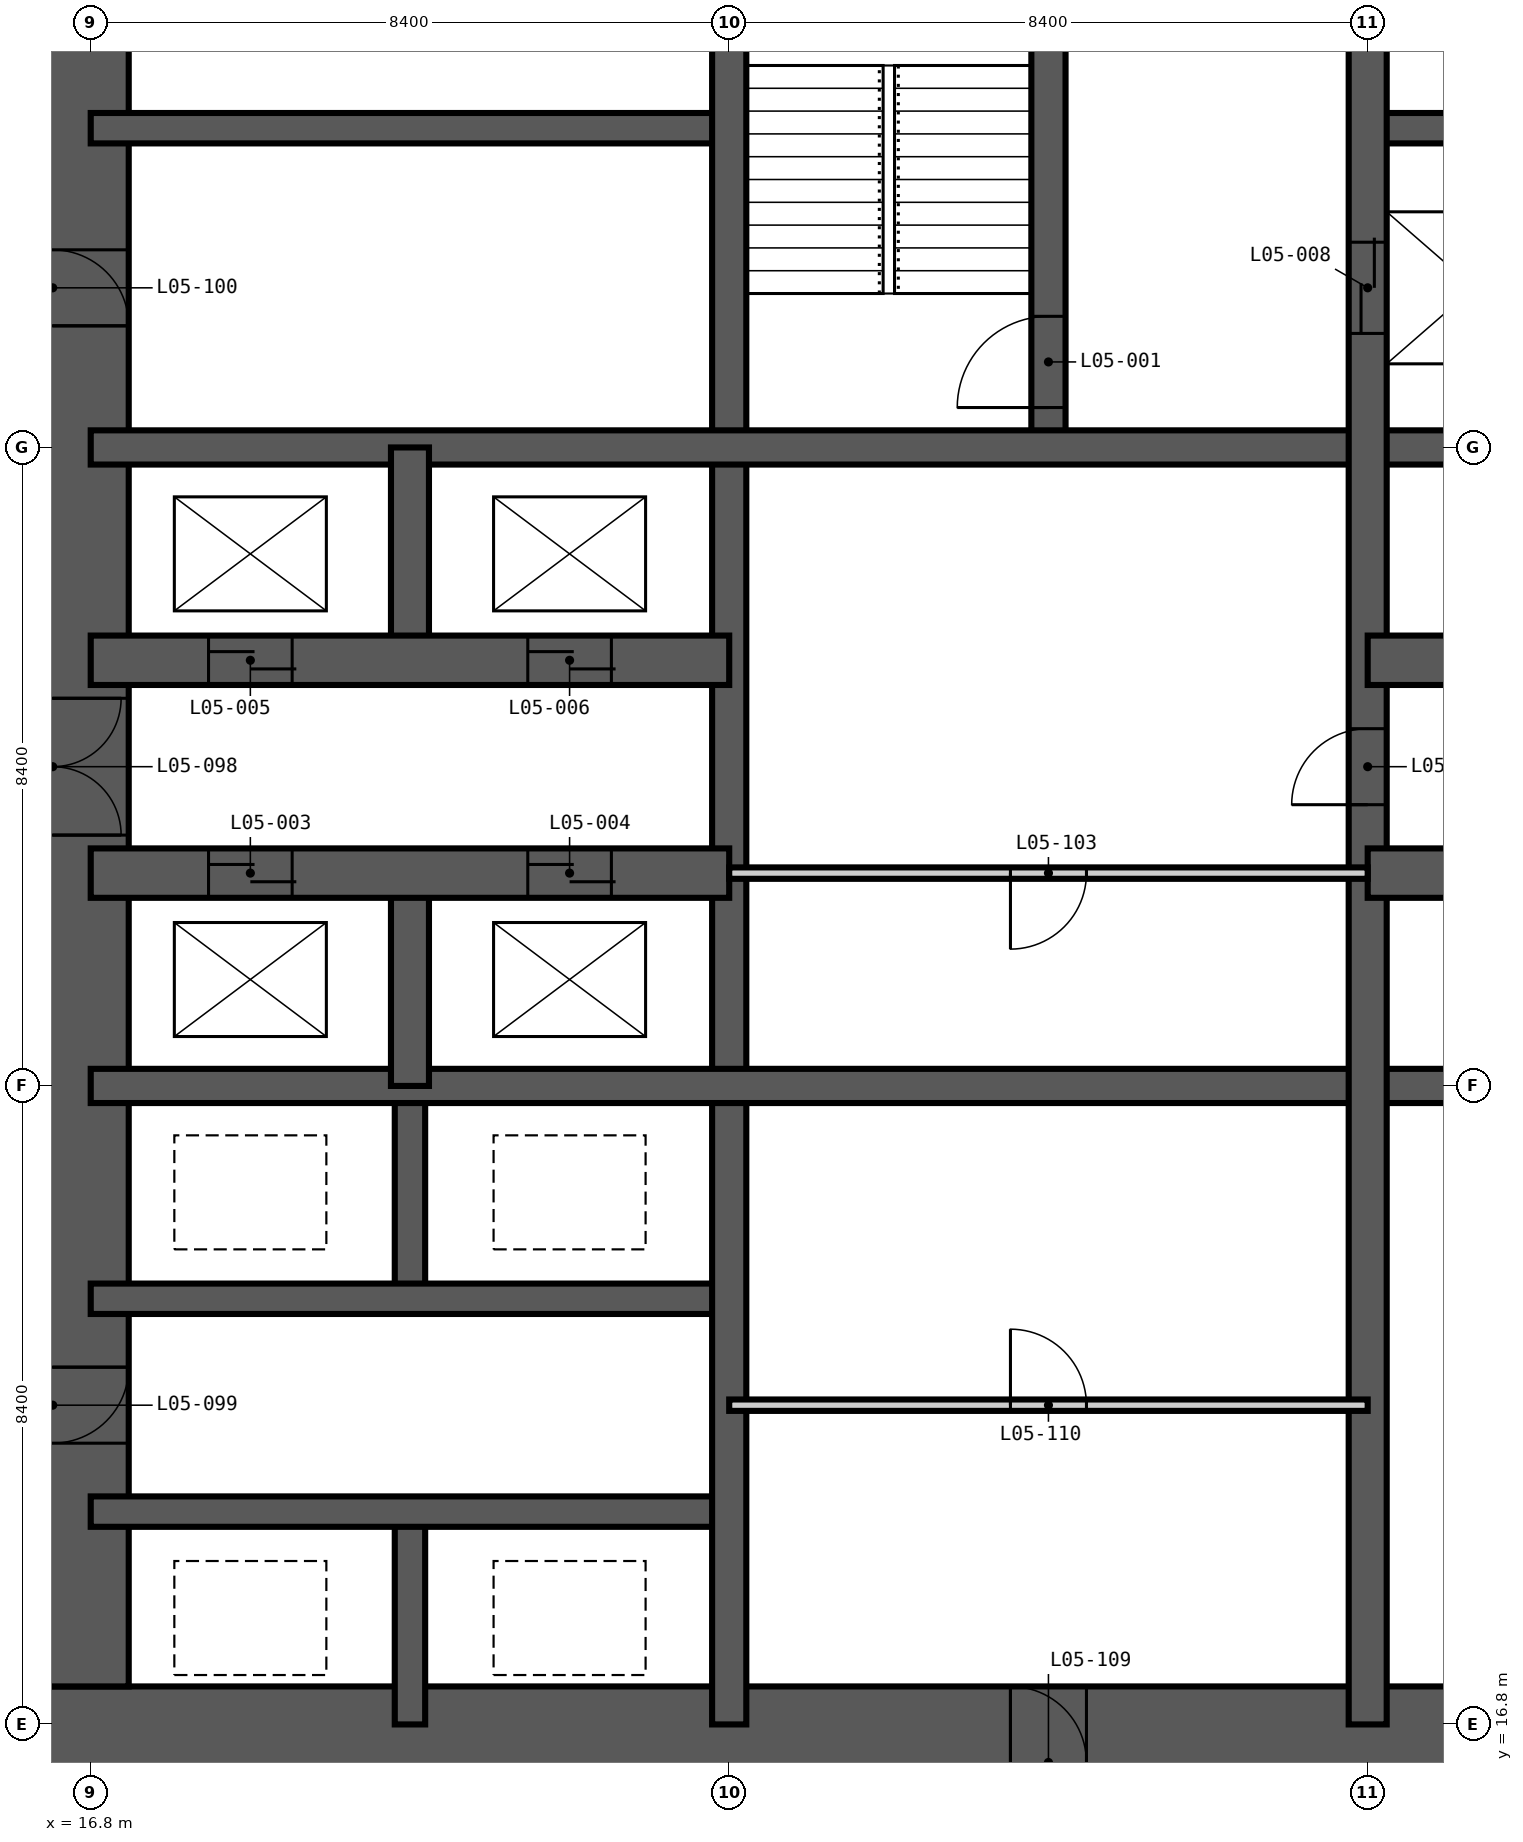
"""IFC4 building model, lengths in metres.
Left out: names, types, materials, properties, quantities, classifications, styles, units other than length and angle.
Written with IfcOpenShell. Run it as: python <this file> out.ifc"""

import sys

from ifc_helpers import new_model, si_unit, direction, frame, frame_2d, origin, place, context, subcontext, project, spatial, rectangle, extrude, element, fill, save


model = new_model("IFC4")
c1 = context("Model", 3, precision=1e-05, world=origin(), true_north=direction((0.0, 1.0)))
c2 = subcontext(c1, "Body", "Model", "MODEL_VIEW")
j1 = project(units=[si_unit("LENGTHUNIT", "METRE"), si_unit("PLANEANGLEUNIT", "RADIAN")], contexts=[c1])
p1 = place(None, origin())
s1 = spatial("IfcSite", under=j1, at=p1, CompositionType="ELEMENT")
p2 = place(p1, origin())
s2 = spatial("IfcBuilding", under=s1, at=p2, CompositionType="ELEMENT")
p3 = place(p2, frame((0.0, 0.0, 27.0)))
s3 = spatial("IfcBuildingStorey", under=s2, at=p3, CompositionType="ELEMENT", Elevation=27.0)
p4 = place(p3, frame((15.3, 16.3, -0.35), z_axis=(0.0, 0.0, 1.0), x_axis=(1.0, 0.0, 0.0)))
e1 = element("IfcWall", 1, at=p4, inside=s3, PredefinedType="SHEAR", context=c2, shape_type="SweptSolid", body=[
    extrude(rectangle(XDim=28.2, YDim=2.0, at=frame_2d((14.1, 0.0))), origin(), (0.0, 0.0, 1.0), 3.6),
])
p5 = place(p4, frame((13.6, 0.0, 0.35)))
e2 = element("IfcOpeningElement", 2, at=p5, cuts=e1, PredefinedType="OPENING", context=c2, shape_type="SweptSolid", body=[
    extrude(rectangle(XDim=1.0, YDim=2.1, at=frame_2d((0.5, 1.05))), frame((0.0, 1.01, 0.0), z_axis=(0.0, -1.0, 0.0), x_axis=(1.0, 0.0, 0.0)), (0.0, 0.0, 1.0), 2.02),
])
p6 = place(p4, frame((19.9, 0.0, 0.35)))
e3 = element("IfcOpeningElement", 3, at=p6, cuts=e1, PredefinedType="OPENING", context=c2, shape_type="SweptSolid", body=[
    extrude(rectangle(XDim=1.0, YDim=2.1, at=frame_2d((0.5, 1.05))), frame((0.0, 1.01, 0.0), z_axis=(0.0, -1.0, 0.0), x_axis=(1.0, 0.0, 0.0)), (0.0, 0.0, 1.0), 2.02),
])
p7 = place(p3, frame((16.3, 41.5, -0.35), z_axis=(0.0, 0.0, 1.0), x_axis=(0.0, -1.0, 0.0)))
e4 = element("IfcWall", 4, at=p7, inside=s3, PredefinedType="SHEAR", context=c2, shape_type="SweptSolid", body=[
    extrude(rectangle(XDim=24.2, YDim=2.0, at=frame_2d((12.1, 0.0))), origin(), (0.0, 0.0, 1.0), 3.6),
])
p8 = place(p7, frame((11.2, 0.0, 0.35)))
e5 = element("IfcOpeningElement", 5, at=p8, cuts=e4, PredefinedType="OPENING", context=c2, shape_type="SweptSolid", body=[
    extrude(rectangle(XDim=1.8, YDim=2.2, at=frame_2d((0.9, 1.1))), frame((0.0, 1.01, 0.0), z_axis=(0.0, -1.0, 0.0), x_axis=(1.0, 0.0, 0.0)), (0.0, 0.0, 1.0), 2.02),
])
p9 = place(p7, frame((20.0, 0.0, 0.35)))
e6 = element("IfcOpeningElement", 6, at=p9, cuts=e4, PredefinedType="OPENING", context=c2, shape_type="SweptSolid", body=[
    extrude(rectangle(XDim=1.0, YDim=2.1, at=frame_2d((0.5, 1.05))), frame((0.0, 1.01, 0.0), z_axis=(0.0, -1.0, 0.0), x_axis=(1.0, 0.0, 0.0)), (0.0, 0.0, 1.0), 2.02),
])
p10 = place(p7, frame((5.3, 0.0, 0.35)))
e7 = element("IfcOpeningElement", 7, at=p10, cuts=e4, PredefinedType="OPENING", context=c2, shape_type="SweptSolid", body=[
    extrude(rectangle(XDim=1.0, YDim=2.1, at=frame_2d((0.5, 1.05))), frame((0.0, 1.01, 0.0), z_axis=(0.0, -1.0, 0.0), x_axis=(1.0, 0.0, 0.0)), (0.0, 0.0, 1.0), 2.02),
])
for number, where, z_axis, x_axis in (
    (8, (21.0, 16.8, -0.35), (0.0, 0.0, 1.0), (0.0, 1.0, 0.0)),
    (9, (21.0, 22.4, -0.35), (0.0, 0.0, 1.0), (0.0, 1.0, 0.0)),
):
    element("IfcWall", number, at=place(p3, frame(where, z_axis=z_axis, x_axis=x_axis)), inside=s3, PredefinedType="SHEAR", context=c2, shape_type="SweptSolid", body=[
        extrude(rectangle(XDim=2.8, YDim=0.4, at=frame_2d((1.4, 0.0))), origin(), (0.0, 0.0, 1.0), 3.6),
    ])
for number, where, z_axis, x_axis in (
    (10, (16.8, 19.6, -0.35), (0.0, 0.0, 1.0), (1.0, 0.0, 0.0)),
    (11, (16.8, 22.4, -0.35), (0.0, 0.0, 1.0), (1.0, 0.0, 0.0)),
    (12, (16.8, 37.8, -0.35), (0.0, 0.0, 1.0), (1.0, 0.0, 0.0)),
):
    element("IfcWall", number, at=place(p3, frame(where, z_axis=z_axis, x_axis=x_axis)), inside=s3, PredefinedType="SHEAR", context=c2, shape_type="SweptSolid", body=[
        extrude(rectangle(XDim=8.4, YDim=0.4, at=frame_2d((4.2, 0.0))), origin(), (0.0, 0.0, 1.0), 3.6),
    ])
p11 = place(p3, frame((33.6, 37.8, -0.35), z_axis=(0.0, 0.0, 1.0), x_axis=(1.0, 0.0, 0.0)))
e13 = element("IfcWall", 13, at=p11, inside=s3, PredefinedType="SHEAR", context=c2, shape_type="SweptSolid", body=[
    extrude(rectangle(XDim=2.8, YDim=0.4, at=frame_2d((1.4, 0.0))), origin(), (0.0, 0.0, 1.0), 3.6),
])
p12 = place(p3, frame((25.2, 16.8, -0.35), z_axis=(0.0, 0.0, 1.0), x_axis=(0.0, 1.0, 0.0)))
e14 = element("IfcWall", 14, at=p12, inside=s3, PredefinedType="SHEAR", context=c2, shape_type="SweptSolid", body=[
    extrude(rectangle(XDim=25.2, YDim=0.45, at=frame_2d((12.6, 0.0))), origin(), (0.0, 0.0, 1.0), 3.6),
])
p13 = place(p3, frame((29.4, 33.6, -0.35), z_axis=(0.0, 0.0, 1.0), x_axis=(0.0, 1.0, 0.0)))
e15 = element("IfcWall", 15, at=p13, inside=s3, PredefinedType="SHEAR", context=c2, shape_type="SweptSolid", body=[
    extrude(rectangle(XDim=8.4, YDim=0.45, at=frame_2d((4.2, 0.0))), origin(), (0.0, 0.0, 1.0), 3.6),
])
p14 = place(p13, frame((0.525, 0.0, 0.35)))
e16 = element("IfcOpeningElement", 16, at=p14, cuts=e15, PredefinedType="OPENING", context=c2, shape_type="SweptSolid", body=[
    extrude(rectangle(XDim=1.2, YDim=2.2, at=frame_2d((0.6, 1.1))), frame((0.0, 0.235, 0.0), z_axis=(0.0, -1.0, 0.0), x_axis=(1.0, 0.0, 0.0)), (0.0, 0.0, 1.0), 0.47),
])
for number, where, z_axis, x_axis in (
    (17, (16.8, 25.2, -0.35), (0.0, 0.0, 1.0), (1.0, 0.0, 0.0)),
    (18, (16.8, 33.6, -0.35), (0.0, 0.0, 1.0), (1.0, 0.0, 0.0)),
):
    element("IfcWall", number, at=place(p3, frame(where, z_axis=z_axis, x_axis=x_axis)), inside=s3, PredefinedType="SHEAR", context=c2, shape_type="SweptSolid", body=[
        extrude(rectangle(XDim=25.2, YDim=0.45, at=frame_2d((12.6, 0.0))), origin(), (0.0, 0.0, 1.0), 3.6),
    ])
for number, where, z_axis, x_axis in (
    (19, (21.0, 25.2, -0.35), (0.0, 0.0, 1.0), (0.0, 1.0, 0.0)),
    (20, (21.0, 30.8, -0.35), (0.0, 0.0, 1.0), (0.0, 1.0, 0.0)),
):
    element("IfcWall", number, at=place(p3, frame(where, z_axis=z_axis, x_axis=x_axis)), inside=s3, PredefinedType="SHEAR", context=c2, shape_type="SweptSolid", body=[
        extrude(rectangle(XDim=2.8, YDim=0.5, at=frame_2d((1.4, 0.0))), origin(), (0.0, 0.0, 1.0), 3.6),
    ])
p15 = place(p3, frame((33.6, 16.8, -0.35), z_axis=(0.0, 0.0, 1.0), x_axis=(0.0, 1.0, 0.0)))
e21 = element("IfcWall", 21, at=p15, inside=s3, PredefinedType="SHEAR", context=c2, shape_type="SweptSolid", body=[
    extrude(rectangle(XDim=25.2, YDim=0.5, at=frame_2d((12.6, 0.0))), origin(), (0.0, 0.0, 1.0), 3.6),
])
p16 = place(p15, frame((22.5, 0.0, 0.35)))
e22 = element("IfcOpeningElement", 22, at=p16, cuts=e21, PredefinedType="OPENING", context=c2, shape_type="SweptSolid", body=[
    extrude(rectangle(XDim=1.2, YDim=2.2, at=frame_2d((0.6, 1.1))), frame((0.0, 0.26, 0.0), z_axis=(0.0, -1.0, 0.0), x_axis=(1.0, 0.0, 0.0)), (0.0, 0.0, 1.0), 0.52),
])
p17 = place(p15, frame((18.3, 0.0, 0.35)))
e23 = element("IfcOpeningElement", 23, at=p17, cuts=e21, PredefinedType="OPENING", context=c2, shape_type="SweptSolid", body=[
    extrude(rectangle(XDim=1.2, YDim=2.2, at=frame_2d((0.6, 1.1))), frame((0.0, 0.26, 0.0), z_axis=(0.0, -1.0, 0.0), x_axis=(1.0, 0.0, 0.0)), (0.0, 0.0, 1.0), 0.52),
])
p18 = place(p15, frame((12.1, 0.0, 0.35)))
e24 = element("IfcOpeningElement", 24, at=p18, cuts=e21, PredefinedType="OPENING", context=c2, shape_type="SweptSolid", body=[
    extrude(rectangle(XDim=1.0, YDim=2.1, at=frame_2d((0.5, 1.05))), frame((0.0, 0.26, 0.0), z_axis=(0.0, -1.0, 0.0), x_axis=(1.0, 0.0, 0.0)), (0.0, 0.0, 1.0), 0.52),
])
p19 = place(p3, frame((16.8, 28.0, -0.35), z_axis=(0.0, 0.0, 1.0), x_axis=(1.0, 0.0, 0.0)))
e25 = element("IfcWall", 25, at=p19, inside=s3, PredefinedType="SHEAR", context=c2, shape_type="SweptSolid", body=[
    extrude(rectangle(XDim=8.4, YDim=0.65, at=frame_2d((4.2, 0.0))), origin(), (0.0, 0.0, 1.0), 3.6),
])
p20 = place(p19, frame((1.55, 0.0, 0.35)))
e26 = element("IfcOpeningElement", 26, at=p20, cuts=e25, PredefinedType="OPENING", context=c2, shape_type="SweptSolid", body=[
    extrude(rectangle(XDim=1.1, YDim=2.2, at=frame_2d((0.55, 1.1))), frame((0.0, 0.335, 0.0), z_axis=(0.0, -1.0, 0.0), x_axis=(1.0, 0.0, 0.0)), (0.0, 0.0, 1.0), 0.67),
])
p21 = place(p19, frame((5.75, 0.0, 0.35)))
e27 = element("IfcOpeningElement", 27, at=p21, cuts=e25, PredefinedType="OPENING", context=c2, shape_type="SweptSolid", body=[
    extrude(rectangle(XDim=1.1, YDim=2.2, at=frame_2d((0.55, 1.1))), frame((0.0, 0.335, 0.0), z_axis=(0.0, -1.0, 0.0), x_axis=(1.0, 0.0, 0.0)), (0.0, 0.0, 1.0), 0.67),
])
p22 = place(p3, frame((33.6, 28.0, -0.35), z_axis=(0.0, 0.0, 1.0), x_axis=(1.0, 0.0, 0.0)))
e28 = element("IfcWall", 28, at=p22, inside=s3, PredefinedType="SHEAR", context=c2, shape_type="SweptSolid", body=[
    extrude(rectangle(XDim=8.4, YDim=0.65, at=frame_2d((4.2, 0.0))), origin(), (0.0, 0.0, 1.0), 3.6),
])
p23 = place(p3, frame((16.8, 30.8, -0.35), z_axis=(0.0, 0.0, 1.0), x_axis=(1.0, 0.0, 0.0)))
e29 = element("IfcWall", 29, at=p23, inside=s3, PredefinedType="SHEAR", context=c2, shape_type="SweptSolid", body=[
    extrude(rectangle(XDim=8.4, YDim=0.65, at=frame_2d((4.2, 0.0))), origin(), (0.0, 0.0, 1.0), 3.6),
])
p24 = place(p23, frame((1.55, 0.0, 0.35)))
e30 = element("IfcOpeningElement", 30, at=p24, cuts=e29, PredefinedType="OPENING", context=c2, shape_type="SweptSolid", body=[
    extrude(rectangle(XDim=1.1, YDim=2.2, at=frame_2d((0.55, 1.1))), frame((0.0, 0.335, 0.0), z_axis=(0.0, -1.0, 0.0), x_axis=(1.0, 0.0, 0.0)), (0.0, 0.0, 1.0), 0.67),
])
p25 = place(p23, frame((5.75, 0.0, 0.35)))
e31 = element("IfcOpeningElement", 31, at=p25, cuts=e29, PredefinedType="OPENING", context=c2, shape_type="SweptSolid", body=[
    extrude(rectangle(XDim=1.1, YDim=2.2, at=frame_2d((0.55, 1.1))), frame((0.0, 0.335, 0.0), z_axis=(0.0, -1.0, 0.0), x_axis=(1.0, 0.0, 0.0)), (0.0, 0.0, 1.0), 0.67),
])
p26 = place(p3, frame((33.6, 30.8, -0.35), z_axis=(0.0, 0.0, 1.0), x_axis=(1.0, 0.0, 0.0)))
e32 = element("IfcWall", 32, at=p26, inside=s3, PredefinedType="SHEAR", context=c2, shape_type="SweptSolid", body=[
    extrude(rectangle(XDim=8.4, YDim=0.65, at=frame_2d((4.2, 0.0))), origin(), (0.0, 0.0, 1.0), 3.6),
])
p27 = place(p26, frame((1.6, 0.0, 0.35)))
e33 = element("IfcOpeningElement", 33, at=p27, cuts=e32, PredefinedType="OPENING", context=c2, shape_type="SweptSolid", body=[
    extrude(rectangle(XDim=1.0, YDim=2.1, at=frame_2d((0.5, 1.05))), frame((0.0, 0.335, 0.0), z_axis=(0.0, -1.0, 0.0), x_axis=(1.0, 0.0, 0.0)), (0.0, 0.0, 1.0), 0.67),
])
p28 = place(p26, frame((4.6, 0.0, 0.35)))
e34 = element("IfcOpeningElement", 34, at=p28, cuts=e32, PredefinedType="OPENING", context=c2, shape_type="SweptSolid", body=[
    extrude(rectangle(XDim=1.0, YDim=2.1, at=frame_2d((0.5, 1.05))), frame((0.0, 0.335, 0.0), z_axis=(0.0, -1.0, 0.0), x_axis=(1.0, 0.0, 0.0)), (0.0, 0.0, 1.0), 0.67),
])
p29 = place(p3, frame((25.2, 21.0, 0.0), z_axis=(0.0, 0.0, 1.0), x_axis=(1.0, 0.0, 0.0)))
e35 = element("IfcWall", 35, at=p29, inside=s3, PredefinedType="PARTITIONING", context=c2, shape_type="SweptSolid", body=[
    extrude(rectangle(XDim=8.4, YDim=0.15, at=frame_2d((4.2, 0.0))), origin(), (0.0, 0.0, 1.0), 3.25),
])
p30 = place(p29, frame((3.7, 0.0, 0.0)))
e36 = element("IfcOpeningElement", 36, at=p30, cuts=e35, PredefinedType="OPENING", context=c2, shape_type="SweptSolid", body=[
    extrude(rectangle(XDim=1.0, YDim=2.1, at=frame_2d((0.5, 1.05))), frame((0.0, 0.085, 0.0), z_axis=(0.0, -1.0, 0.0), x_axis=(1.0, 0.0, 0.0)), (0.0, 0.0, 1.0), 0.17),
])
p31 = place(p3, frame((25.2, 28.0, 0.0), z_axis=(0.0, 0.0, 1.0), x_axis=(1.0, 0.0, 0.0)))
e37 = element("IfcWall", 37, at=p31, inside=s3, PredefinedType="PARTITIONING", context=c2, shape_type="SweptSolid", body=[
    extrude(rectangle(XDim=8.4, YDim=0.15, at=frame_2d((4.2, 0.0))), origin(), (0.0, 0.0, 1.0), 3.25),
])
p32 = place(p31, frame((3.7, 0.0, 0.0)))
e38 = element("IfcOpeningElement", 38, at=p32, cuts=e37, PredefinedType="OPENING", context=c2, shape_type="SweptSolid", body=[
    extrude(rectangle(XDim=1.0, YDim=2.1, at=frame_2d((0.5, 1.05))), frame((0.0, 0.085, 0.0), z_axis=(0.0, -1.0, 0.0), x_axis=(1.0, 0.0, 0.0)), (0.0, 0.0, 1.0), 0.17),
])
p33 = place(p14, origin())
e39 = element("IfcDoor", 39, at=p33, inside=s3, OperationType="SINGLE_SWING_LEFT", PredefinedType="DOOR", context=c2, shape_type="SweptSolid", body=[
    extrude(rectangle(XDim=1.2, YDim=2.2, at=frame_2d((0.6, 1.1))), frame((0.0, 0.025, 0.0), z_axis=(0.0, -1.0, 0.0), x_axis=(1.0, 0.0, 0.0)), (0.0, 0.0, 1.0), 0.05),
])
fill(e16, e39)
p34 = place(p20, origin())
e40 = element("IfcDoor", 40, at=p34, inside=s3, OperationType="DOUBLE_DOOR_SLIDING", PredefinedType="DOOR", context=c2, shape_type="SweptSolid", body=[
    extrude(rectangle(XDim=1.1, YDim=2.2, at=frame_2d((0.55, 1.1))), frame((0.0, 0.025, 0.0), z_axis=(0.0, -1.0, 0.0), x_axis=(1.0, 0.0, 0.0)), (0.0, 0.0, 1.0), 0.05),
])
fill(e26, e40)
p35 = place(p21, origin())
e41 = element("IfcDoor", 41, at=p35, inside=s3, OperationType="DOUBLE_DOOR_SLIDING", PredefinedType="DOOR", context=c2, shape_type="SweptSolid", body=[
    extrude(rectangle(XDim=1.1, YDim=2.2, at=frame_2d((0.55, 1.1))), frame((0.0, 0.025, 0.0), z_axis=(0.0, -1.0, 0.0), x_axis=(1.0, 0.0, 0.0)), (0.0, 0.0, 1.0), 0.05),
])
fill(e27, e41)
p36 = place(p24, origin())
e42 = element("IfcDoor", 42, at=p36, inside=s3, OperationType="DOUBLE_DOOR_SLIDING", PredefinedType="DOOR", context=c2, shape_type="SweptSolid", body=[
    extrude(rectangle(XDim=1.1, YDim=2.2, at=frame_2d((0.55, 1.1))), frame((0.0, 0.025, 0.0), z_axis=(0.0, -1.0, 0.0), x_axis=(1.0, 0.0, 0.0)), (0.0, 0.0, 1.0), 0.05),
])
fill(e30, e42)
p37 = place(p25, origin())
e43 = element("IfcDoor", 43, at=p37, inside=s3, OperationType="DOUBLE_DOOR_SLIDING", PredefinedType="DOOR", context=c2, shape_type="SweptSolid", body=[
    extrude(rectangle(XDim=1.1, YDim=2.2, at=frame_2d((0.55, 1.1))), frame((0.0, 0.025, 0.0), z_axis=(0.0, -1.0, 0.0), x_axis=(1.0, 0.0, 0.0)), (0.0, 0.0, 1.0), 0.05),
])
fill(e31, e43)
p38 = place(p17, origin())
e44 = element("IfcDoor", 44, at=p38, inside=s3, OperationType="DOUBLE_DOOR_SLIDING", PredefinedType="DOOR", context=c2, shape_type="SweptSolid", body=[
    extrude(rectangle(XDim=1.2, YDim=2.2, at=frame_2d((0.6, 1.1))), frame((0.0, 0.025, 0.0), z_axis=(0.0, -1.0, 0.0), x_axis=(1.0, 0.0, 0.0)), (0.0, 0.0, 1.0), 0.05),
])
fill(e23, e44)
p39 = place(p8, origin())
e45 = element("IfcDoor", 45, at=p39, inside=s3, OperationType="DOUBLE_DOOR_DOUBLE_SWING", PredefinedType="DOOR", context=c2, shape_type="SweptSolid", body=[
    extrude(rectangle(XDim=1.8, YDim=2.2, at=frame_2d((0.9, 1.1))), frame((0.0, 0.025, 0.0), z_axis=(0.0, -1.0, 0.0), x_axis=(1.0, 0.0, 0.0)), (0.0, 0.0, 1.0), 0.05),
])
fill(e5, e45)
p40 = place(p9, origin())
e46 = element("IfcDoor", 46, at=p40, inside=s3, OperationType="SINGLE_SWING_LEFT", PredefinedType="DOOR", context=c2, shape_type="SweptSolid", body=[
    extrude(rectangle(XDim=1.0, YDim=2.1, at=frame_2d((0.5, 1.05))), frame((0.0, 0.025, 0.0), z_axis=(0.0, -1.0, 0.0), x_axis=(1.0, 0.0, 0.0)), (0.0, 0.0, 1.0), 0.05),
])
fill(e6, e46)
p41 = place(p10, origin())
e47 = element("IfcDoor", 47, at=p41, inside=s3, OperationType="SINGLE_SWING_RIGHT", PredefinedType="DOOR", context=c2, shape_type="SweptSolid", body=[
    extrude(rectangle(XDim=1.0, YDim=2.1, at=frame_2d((0.5, 1.05))), frame((0.0, 0.025, 0.0), z_axis=(0.0, -1.0, 0.0), x_axis=(1.0, 0.0, 0.0)), (0.0, 0.0, 1.0), 0.05),
])
fill(e7, e47)
p42 = place(p18, origin())
e48 = element("IfcDoor", 48, at=p42, inside=s3, OperationType="SINGLE_SWING_LEFT", PredefinedType="DOOR", context=c2, shape_type="SweptSolid", body=[
    extrude(rectangle(XDim=1.0, YDim=2.1, at=frame_2d((0.5, 1.05))), frame((0.0, 0.025, 0.0), z_axis=(0.0, -1.0, 0.0), x_axis=(1.0, 0.0, 0.0)), (0.0, 0.0, 1.0), 0.05),
])
fill(e24, e48)
p43 = place(p32, frame((1.0, 0.0, 0.0), z_axis=(0.0, 0.0, 1.0), x_axis=(-1.0, 0.0, 0.0)))
e49 = element("IfcDoor", 49, at=p43, inside=s3, OperationType="SINGLE_SWING_RIGHT", PredefinedType="DOOR", context=c2, shape_type="SweptSolid", body=[
    extrude(rectangle(XDim=1.0, YDim=2.1, at=frame_2d((0.5, 1.05))), frame((0.0, 0.025, 0.0), z_axis=(0.0, -1.0, 0.0), x_axis=(1.0, 0.0, 0.0)), (0.0, 0.0, 1.0), 0.05),
])
fill(e38, e49)
p44 = place(p5, origin())
e50 = element("IfcDoor", 50, at=p44, inside=s3, OperationType="SINGLE_SWING_LEFT", PredefinedType="DOOR", context=c2, shape_type="SweptSolid", body=[
    extrude(rectangle(XDim=1.0, YDim=2.1, at=frame_2d((0.5, 1.05))), frame((0.0, 0.025, 0.0), z_axis=(0.0, -1.0, 0.0), x_axis=(1.0, 0.0, 0.0)), (0.0, 0.0, 1.0), 0.05),
])
fill(e2, e50)
p45 = place(p30, origin())
e51 = element("IfcDoor", 51, at=p45, inside=s3, OperationType="SINGLE_SWING_LEFT", PredefinedType="DOOR", context=c2, shape_type="SweptSolid", body=[
    extrude(rectangle(XDim=1.0, YDim=2.1, at=frame_2d((0.5, 1.05))), frame((0.0, 0.025, 0.0), z_axis=(0.0, -1.0, 0.0), x_axis=(1.0, 0.0, 0.0)), (0.0, 0.0, 1.0), 0.05),
])
fill(e36, e51)
save(model, sys.argv[1])
